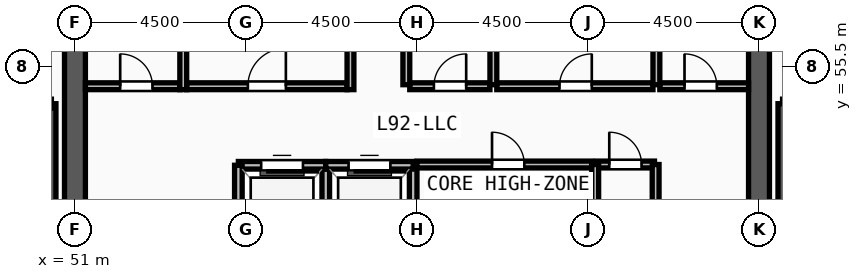
"""IFC4 building model, lengths in metres.
Left out: names, types, materials, properties, quantities, classifications, styles, units other than length and angle.
Written with IfcOpenShell. Run it as: python <this file> out.ifc"""

import sys

from ifc_helpers import new_model, si_unit, direction, frame, frame_2d, origin, place, context, subcontext, project, spatial, rectangle, extrude, source, transform, mapped, element, fill, save


model = new_model("IFC4")
c1 = context("Model", 3, precision=1e-05, world=origin(), true_north=direction((0.0, 1.0)))
c2 = subcontext(c1, "Body", "Model", "MODEL_VIEW")
j1 = project(units=[si_unit("LENGTHUNIT", "METRE"), si_unit("PLANEANGLEUNIT", "RADIAN")], contexts=[c1])
p1 = place(None, origin())
s1 = spatial("IfcSite", under=j1, at=p1, CompositionType="ELEMENT")
p2 = place(p1, origin())
s2 = spatial("IfcBuilding", under=s1, at=p2, CompositionType="ELEMENT")
p3 = place(p2, frame((0.0, 0.0, 355.8)))
s3 = spatial("IfcBuildingStorey", under=s2, at=p3, CompositionType="ELEMENT", Elevation=355.8)
p4 = place(p3, frame((69.0, 60.975, 0.0), z_axis=(0.0, 0.0, 1.0), x_axis=(0.0, -1.0, 0.0)))
e1 = element("IfcWall", 1, at=p4, inside=s3, PredefinedType="SHEAR", context=c2, shape_type="SweptSolid", body=[
    extrude(rectangle(XDim=13.95, YDim=0.55, at=frame_2d((6.975, 0.0))), origin(), (0.0, 0.0, 1.0), 4.35),
])
m1 = source(origin(), c2, "Body", "SweptSolid", [
    extrude(rectangle(XDim=1.2, YDim=2.2, at=frame_2d((0.6, 1.1))), frame((0.0, 0.285, 0.0), z_axis=(0.0, -1.0, 0.0), x_axis=(1.0, 0.0, 0.0)), (0.0, 0.0, 1.0), 0.57),
])
p5 = place(p4, frame((1.425, 0.0, 0.0)))
e2 = element("IfcOpeningElement", 2, at=p5, cuts=e1, PredefinedType="OPENING", context=c2, shape_type="MappedRepresentation", body=[
    mapped(m1, transform((0.0, 0.0, 0.0), x_axis=(1.0, 0.0, 0.0), y_axis=(0.0, 1.0, 0.0), z_axis=(0.0, 0.0, 1.0), scale=1.0)),
])
p6 = place(p3, frame((51.0, 47.025, 0.0), z_axis=(0.0, 0.0, 1.0), x_axis=(0.0, 1.0, 0.0)))
e3 = element("IfcWall", 3, at=p6, inside=s3, PredefinedType="SHEAR", context=c2, shape_type="SweptSolid", body=[
    extrude(rectangle(XDim=13.95, YDim=0.55, at=frame_2d((6.975, 0.0))), origin(), (0.0, 0.0, 1.0), 4.35),
])
for number, where, z_axis, x_axis in (
    (4, (50.38, 46.7, 0.0), (0.0, 0.0, 1.0), (0.0, 1.0, 0.0)),
    (5, (69.62, 54.52, 0.0), (0.0, 0.0, 1.0), (0.0, -1.0, 0.0)),
):
    element("IfcWall", number, at=place(p3, frame(where, z_axis=z_axis, x_axis=x_axis)), inside=s3, PredefinedType="SOLIDWALL", context=c2, shape_type="SweptSolid", body=[
        extrude(rectangle(XDim=7.82, YDim=0.24, at=frame_2d((3.91, 0.0))), origin(), (0.0, 0.0, 1.0), 4.35),
    ])
p7 = place(p3, frame((57.6, 50.3, 0.0), z_axis=(0.0, 0.0, 1.0), x_axis=(0.0, 1.0, 0.0)))
e6 = element("IfcWall", 6, at=p7, inside=s3, PredefinedType="SOLIDWALL", context=c2, shape_type="SweptSolid", body=[
    extrude(rectangle(XDim=2.6, YDim=0.2, at=frame_2d((1.3, 0.0))), origin(), (0.0, 0.0, 1.0), 4.35),
])
p8 = place(p3, frame((57.6, 52.9, 0.0), z_axis=(0.0, 0.0, 1.0), x_axis=(-1.0, 0.0, 0.0)))
e7 = element("IfcWall", 7, at=p8, inside=s3, PredefinedType="SOLIDWALL", context=c2, shape_type="SweptSolid", body=[
    extrude(rectangle(XDim=2.3, YDim=0.2, at=frame_2d((1.15, 0.0))), origin(), (0.0, 0.0, 1.0), 4.35),
])
m2 = source(origin(), c2, "Body", "SweptSolid", [
    extrude(rectangle(XDim=1.1, YDim=2.2, at=frame_2d((0.55, 1.1))), frame((0.0, 0.11, 0.0), z_axis=(0.0, -1.0, 0.0), x_axis=(1.0, 0.0, 0.0)), (0.0, 0.0, 1.0), 0.22),
])
p9 = place(p8, frame((0.6, 0.0, 0.0)))
e8 = element("IfcOpeningElement", 8, at=p9, cuts=e7, PredefinedType="OPENING", context=c2, shape_type="MappedRepresentation", body=[
    mapped(m2, transform((0.0, 0.0, 0.0), x_axis=(1.0, 0.0, 0.0), y_axis=(0.0, 1.0, 0.0), z_axis=(0.0, 0.0, 1.0), scale=1.0)),
])
for number, where, z_axis, x_axis in (
    (9, (55.3, 52.9, 0.0), (0.0, 0.0, 1.0), (0.0, -1.0, 0.0)),
    (10, (59.9, 50.3, 0.0), (0.0, 0.0, 1.0), (0.0, 1.0, 0.0)),
):
    element("IfcWall", number, at=place(p3, frame(where, z_axis=z_axis, x_axis=x_axis)), inside=s3, PredefinedType="SOLIDWALL", context=c2, shape_type="SweptSolid", body=[
        extrude(rectangle(XDim=2.6, YDim=0.2, at=frame_2d((1.3, 0.0))), origin(), (0.0, 0.0, 1.0), 4.35),
    ])
p10 = place(p3, frame((59.9, 52.9, 0.0), z_axis=(0.0, 0.0, 1.0), x_axis=(-1.0, 0.0, 0.0)))
e11 = element("IfcWall", 11, at=p10, inside=s3, PredefinedType="SOLIDWALL", context=c2, shape_type="SweptSolid", body=[
    extrude(rectangle(XDim=2.3, YDim=0.2, at=frame_2d((1.15, 0.0))), origin(), (0.0, 0.0, 1.0), 4.35),
])
p11 = place(p10, frame((0.6, 0.0, 0.0)))
e12 = element("IfcOpeningElement", 12, at=p11, cuts=e11, PredefinedType="OPENING", context=c2, shape_type="MappedRepresentation", body=[
    mapped(m2, transform((0.0, 0.0, 0.0), x_axis=(1.0, 0.0, 0.0), y_axis=(0.0, 1.0, 0.0), z_axis=(0.0, 0.0, 1.0), scale=1.0)),
])
p12 = place(p3, frame((60.0, 52.92, 0.0), z_axis=(0.0, 0.0, 1.0), x_axis=(1.0, 0.0, 0.0)))
e13 = element("IfcWall", 13, at=p12, inside=s3, PredefinedType="PARTITIONING", context=c2, shape_type="SweptSolid", body=[
    extrude(rectangle(XDim=4.6, YDim=0.18, at=frame_2d((2.3, 0.0))), origin(), (0.0, 0.0, 1.0), 4.35),
])
m3 = source(origin(), c2, "Body", "SweptSolid", [
    extrude(rectangle(XDim=0.85, YDim=2.1, at=frame_2d((0.425, 1.05))), frame((0.0, 0.1, 0.0), z_axis=(0.0, -1.0, 0.0), x_axis=(1.0, 0.0, 0.0)), (0.0, 0.0, 1.0), 0.2),
])
p13 = place(p12, frame((1.975, 0.0, 0.0)))
e14 = element("IfcOpeningElement", 14, at=p13, cuts=e13, PredefinedType="OPENING", context=c2, shape_type="MappedRepresentation", body=[
    mapped(m3, transform((0.0, 0.0, 0.0), x_axis=(1.0, 0.0, 0.0), y_axis=(0.0, 1.0, 0.0), z_axis=(0.0, 0.0, 1.0), scale=1.0)),
])
p14 = place(p3, frame((53.94, 54.98, 0.0), z_axis=(0.0, 0.0, 1.0), x_axis=(1.0, 0.0, 0.0)))
e15 = element("IfcWall", 15, at=p14, inside=s3, PredefinedType="PARTITIONING", context=c2, shape_type="SweptSolid", body=[
    extrude(rectangle(XDim=4.22, YDim=0.18, at=frame_2d((2.11, 0.0))), origin(), (0.0, 0.0, 1.0), 4.35),
])
m4 = source(origin(), c2, "Body", "SweptSolid", [
    extrude(rectangle(XDim=1.0, YDim=2.2, at=frame_2d((0.5, 1.1))), frame((0.0, 0.1, 0.0), z_axis=(0.0, -1.0, 0.0), x_axis=(1.0, 0.0, 0.0)), (0.0, 0.0, 1.0), 0.2),
])
p15 = place(p14, frame((1.61, 0.0, 0.0)))
e16 = element("IfcOpeningElement", 16, at=p15, cuts=e15, PredefinedType="OPENING", context=c2, shape_type="MappedRepresentation", body=[
    mapped(m4, transform((0.0, 0.0, 0.0), x_axis=(1.0, 0.0, 0.0), y_axis=(0.0, 1.0, 0.0), z_axis=(0.0, 0.0, 1.0), scale=1.0)),
])
p16 = place(p3, frame((51.275, 54.98, 0.0), z_axis=(0.0, 0.0, 1.0), x_axis=(1.0, 0.0, 0.0)))
e17 = element("IfcWall", 17, at=p16, inside=s3, PredefinedType="PARTITIONING", context=c2, shape_type="SweptSolid", body=[
    extrude(rectangle(XDim=2.485, YDim=0.18, at=frame_2d((1.243, 0.0))), origin(), (0.0, 0.0, 1.0), 4.35),
])
p17 = place(p16, frame((0.915, 0.0, 0.0)))
e18 = element("IfcOpeningElement", 18, at=p17, cuts=e17, PredefinedType="OPENING", context=c2, shape_type="MappedRepresentation", body=[
    mapped(m3, transform((0.0, 0.0, 0.0), x_axis=(1.0, 0.0, 0.0), y_axis=(0.0, 1.0, 0.0), z_axis=(0.0, 0.0, 1.0), scale=1.0)),
])
p18 = place(p3, frame((62.1, 54.98, 0.0), z_axis=(0.0, 0.0, 1.0), x_axis=(1.0, 0.0, 0.0)))
e19 = element("IfcWall", 19, at=p18, inside=s3, PredefinedType="PARTITIONING", context=c2, shape_type="SweptSolid", body=[
    extrude(rectangle(XDim=4.11, YDim=0.18, at=frame_2d((2.055, 0.0))), origin(), (0.0, 0.0, 1.0), 4.35),
])
p19 = place(p18, frame((1.65, 0.0, 0.0)))
e20 = element("IfcOpeningElement", 20, at=p19, cuts=e19, PredefinedType="OPENING", context=c2, shape_type="MappedRepresentation", body=[
    mapped(m3, transform((0.0, 0.0, 0.0), x_axis=(1.0, 0.0, 0.0), y_axis=(0.0, 1.0, 0.0), z_axis=(0.0, 0.0, 1.0), scale=1.0)),
])
p20 = place(p3, frame((66.39, 54.98, 0.0), z_axis=(0.0, 0.0, 1.0), x_axis=(1.0, 0.0, 0.0)))
e21 = element("IfcWall", 21, at=p20, inside=s3, PredefinedType="PARTITIONING", context=c2, shape_type="SweptSolid", body=[
    extrude(rectangle(XDim=2.335, YDim=0.18, at=frame_2d((1.167, 0.0))), origin(), (0.0, 0.0, 1.0), 4.35),
])
p21 = place(p20, frame((0.65, 0.0, 0.0)))
e22 = element("IfcOpeningElement", 22, at=p21, cuts=e21, PredefinedType="OPENING", context=c2, shape_type="MappedRepresentation", body=[
    mapped(m3, transform((0.0, 0.0, 0.0), x_axis=(1.0, 0.0, 0.0), y_axis=(0.0, 1.0, 0.0), z_axis=(0.0, 0.0, 1.0), scale=1.0)),
])
p22 = place(p3, frame((59.81, 54.98, 0.0), z_axis=(0.0, 0.0, 1.0), x_axis=(1.0, 0.0, 0.0)))
e23 = element("IfcWall", 23, at=p22, inside=s3, PredefinedType="PARTITIONING", context=c2, shape_type="SweptSolid", body=[
    extrude(rectangle(XDim=2.11, YDim=0.18, at=frame_2d((1.055, 0.0))), origin(), (0.0, 0.0, 1.0), 4.35),
])
p23 = place(p22, frame((0.635, 0.0, 0.0)))
e24 = element("IfcOpeningElement", 24, at=p23, cuts=e23, PredefinedType="OPENING", context=c2, shape_type="MappedRepresentation", body=[
    mapped(m3, transform((0.0, 0.0, 0.0), x_axis=(1.0, 0.0, 0.0), y_axis=(0.0, 1.0, 0.0), z_axis=(0.0, 0.0, 1.0), scale=1.0)),
])
p24 = place(p3, frame((64.72, 52.92, 0.0), z_axis=(0.0, 0.0, 1.0), x_axis=(1.0, 0.0, 0.0)))
e25 = element("IfcWall", 25, at=p24, inside=s3, PredefinedType="PARTITIONING", context=c2, shape_type="SweptSolid", body=[
    extrude(rectangle(XDim=1.53, YDim=0.18, at=frame_2d((0.765, 0.0))), origin(), (0.0, 0.0, 1.0), 4.35),
])
p25 = place(p24, frame((0.34, 0.0, 0.0)))
e26 = element("IfcOpeningElement", 26, at=p25, cuts=e25, PredefinedType="OPENING", context=c2, shape_type="MappedRepresentation", body=[
    mapped(m3, transform((0.0, 0.0, 0.0), x_axis=(1.0, 0.0, 0.0), y_axis=(0.0, 1.0, 0.0), z_axis=(0.0, 0.0, 1.0), scale=1.0)),
])
p26 = place(p3, frame((66.3, 55.02, 0.0), z_axis=(0.0, 0.0, 1.0), x_axis=(0.0, 1.0, 0.0)))
e27 = element("IfcWall", 27, at=p26, inside=s3, PredefinedType="PARTITIONING", context=c2, shape_type="SweptSolid", body=[
    extrude(rectangle(XDim=2.86, YDim=0.18, at=frame_2d((1.43, 0.0))), origin(), (0.0, 0.0, 1.0), 4.35),
])
for number, where, z_axis, x_axis in (
    (28, (59.72, 55.02, 0.0), (0.0, 0.0, 1.0), (0.0, 1.0, 0.0)),
    (29, (62.01, 55.02, 0.0), (0.0, 0.0, 1.0), (0.0, 1.0, 0.0)),
):
    element("IfcWall", number, at=place(p3, frame(where, z_axis=z_axis, x_axis=x_axis)), inside=s3, PredefinedType="PARTITIONING", context=c2, shape_type="SweptSolid", body=[
        extrude(rectangle(XDim=1.73, YDim=0.18, at=frame_2d((0.865, 0.0))), origin(), (0.0, 0.0, 1.0), 4.35),
    ])
for number, where, z_axis, x_axis in (
    (30, (64.69, 50.35, 0.0), (0.0, 0.0, 1.0), (0.0, 1.0, 0.0)),
    (31, (66.28, 50.35, 0.0), (0.0, 0.0, 1.0), (0.0, 1.0, 0.0)),
):
    element("IfcWall", number, at=place(p3, frame(where, z_axis=z_axis, x_axis=x_axis)), inside=s3, PredefinedType="PARTITIONING", context=c2, shape_type="SweptSolid", body=[
        extrude(rectangle(XDim=2.57, YDim=0.18, at=frame_2d((1.285, 0.0))), origin(), (0.0, 0.0, 1.0), 4.35),
    ])
for number, where, z_axis, x_axis in (
    (32, (53.85, 54.89, 0.0), (0.0, 0.0, 1.0), (0.0, 1.0, 0.0)),
    (33, (58.25, 54.89, 0.0), (0.0, 0.0, 1.0), (0.0, 1.0, 0.0)),
):
    element("IfcWall", number, at=place(p3, frame(where, z_axis=z_axis, x_axis=x_axis)), inside=s3, PredefinedType="PARTITIONING", context=c2, shape_type="SweptSolid", body=[
        extrude(rectangle(XDim=2.78, YDim=0.18, at=frame_2d((1.39, 0.0))), origin(), (0.0, 0.0, 1.0), 4.35),
    ])
m5 = source(origin(), c2, "Body", "SweptSolid", [
    extrude(rectangle(XDim=1.1, YDim=2.2, at=frame_2d((0.55, 1.1))), frame((0.0, 0.025, 0.0), z_axis=(0.0, -1.0, 0.0), x_axis=(1.0, 0.0, 0.0)), (0.0, 0.0, 1.0), 0.05),
])
p27 = place(p9, origin())
e34 = element("IfcDoor", 34, at=p27, inside=s3, OperationType="SLIDING_TO_LEFT", PredefinedType="DOOR", context=c2, shape_type="MappedRepresentation", body=[
    mapped(m5, transform((0.0, 0.0, 0.0), x_axis=(1.0, 0.0, 0.0), y_axis=(0.0, 1.0, 0.0), z_axis=(0.0, 0.0, 1.0), scale=1.0)),
])
fill(e8, e34)
p28 = place(p11, origin())
e35 = element("IfcDoor", 35, at=p28, inside=s3, OperationType="SLIDING_TO_LEFT", PredefinedType="DOOR", context=c2, shape_type="MappedRepresentation", body=[
    mapped(m5, transform((0.0, 0.0, 0.0), x_axis=(1.0, 0.0, 0.0), y_axis=(0.0, 1.0, 0.0), z_axis=(0.0, 0.0, 1.0), scale=1.0)),
])
fill(e12, e35)
m6 = source(origin(), c2, "Body", "SweptSolid", [
    extrude(rectangle(XDim=0.85, YDim=2.1, at=frame_2d((0.425, 1.05))), frame((0.0, 0.025, 0.0), z_axis=(0.0, -1.0, 0.0), x_axis=(1.0, 0.0, 0.0)), (0.0, 0.0, 1.0), 0.05),
])
p29 = place(p13, origin())
e36 = element("IfcDoor", 36, at=p29, inside=s3, OperationType="SINGLE_SWING_LEFT", PredefinedType="DOOR", context=c2, shape_type="MappedRepresentation", body=[
    mapped(m6, transform((0.0, 0.0, 0.0), x_axis=(1.0, 0.0, 0.0), y_axis=(0.0, 1.0, 0.0), z_axis=(0.0, 0.0, 1.0), scale=1.0)),
])
fill(e14, e36)
m7 = source(origin(), c2, "Body", "SweptSolid", [
    extrude(rectangle(XDim=1.0, YDim=2.2, at=frame_2d((0.5, 1.1))), frame((0.0, 0.025, 0.0), z_axis=(0.0, -1.0, 0.0), x_axis=(1.0, 0.0, 0.0)), (0.0, 0.0, 1.0), 0.05),
])
p30 = place(p15, origin())
e37 = element("IfcDoor", 37, at=p30, inside=s3, OperationType="SINGLE_SWING_RIGHT", PredefinedType="DOOR", context=c2, shape_type="MappedRepresentation", body=[
    mapped(m7, transform((0.0, 0.0, 0.0), x_axis=(1.0, 0.0, 0.0), y_axis=(0.0, 1.0, 0.0), z_axis=(0.0, 0.0, 1.0), scale=1.0)),
])
fill(e16, e37)
p31 = place(p17, origin())
e38 = element("IfcDoor", 38, at=p31, inside=s3, OperationType="SINGLE_SWING_LEFT", PredefinedType="DOOR", context=c2, shape_type="MappedRepresentation", body=[
    mapped(m6, transform((0.0, 0.0, 0.0), x_axis=(1.0, 0.0, 0.0), y_axis=(0.0, 1.0, 0.0), z_axis=(0.0, 0.0, 1.0), scale=1.0)),
])
fill(e18, e38)
p32 = place(p19, origin())
e39 = element("IfcDoor", 39, at=p32, inside=s3, OperationType="SINGLE_SWING_RIGHT", PredefinedType="DOOR", context=c2, shape_type="MappedRepresentation", body=[
    mapped(m6, transform((0.0, 0.0, 0.0), x_axis=(1.0, 0.0, 0.0), y_axis=(0.0, 1.0, 0.0), z_axis=(0.0, 0.0, 1.0), scale=1.0)),
])
fill(e20, e39)
p33 = place(p21, origin())
e40 = element("IfcDoor", 40, at=p33, inside=s3, OperationType="SINGLE_SWING_LEFT", PredefinedType="DOOR", context=c2, shape_type="MappedRepresentation", body=[
    mapped(m6, transform((0.0, 0.0, 0.0), x_axis=(1.0, 0.0, 0.0), y_axis=(0.0, 1.0, 0.0), z_axis=(0.0, 0.0, 1.0), scale=1.0)),
])
fill(e22, e40)
p34 = place(p23, origin())
e41 = element("IfcDoor", 41, at=p34, inside=s3, OperationType="SINGLE_SWING_RIGHT", PredefinedType="DOOR", context=c2, shape_type="MappedRepresentation", body=[
    mapped(m6, transform((0.0, 0.0, 0.0), x_axis=(1.0, 0.0, 0.0), y_axis=(0.0, 1.0, 0.0), z_axis=(0.0, 0.0, 1.0), scale=1.0)),
])
fill(e24, e41)
p35 = place(p25, origin())
e42 = element("IfcDoor", 42, at=p35, inside=s3, OperationType="SINGLE_SWING_LEFT", PredefinedType="DOOR", context=c2, shape_type="MappedRepresentation", body=[
    mapped(m6, transform((0.0, 0.0, 0.0), x_axis=(1.0, 0.0, 0.0), y_axis=(0.0, 1.0, 0.0), z_axis=(0.0, 0.0, 1.0), scale=1.0)),
])
fill(e26, e42)
save(model, sys.argv[1])
